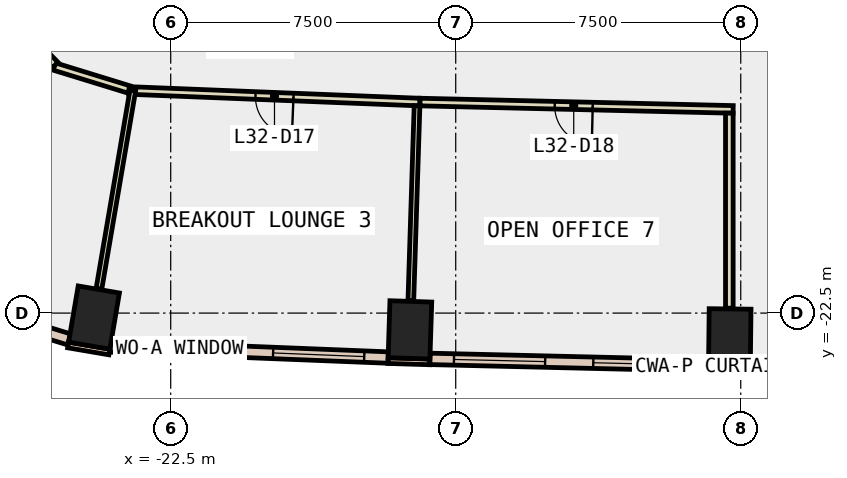
"""IFC4 building model, lengths in metres.
Left out: names, types, materials, properties, quantities, classifications, styles, units other than length and angle.
Written with IfcOpenShell. Run it as: python <this file> out.ifc"""

import sys

from ifc_helpers import new_model, si_unit, direction, frame, frame_2d, origin, origin_2d, place, context, subcontext, project, spatial, rectangle, extrude, element, fill, save


model = new_model("IFC4")
c1 = context("Model", 3, precision=1e-05, world=origin(), true_north=direction((0.0, 1.0)))
c2 = subcontext(c1, "Body", "Model", "MODEL_VIEW")
j1 = project(units=[si_unit("LENGTHUNIT", "METRE"), si_unit("PLANEANGLEUNIT", "RADIAN")], contexts=[c1])
p1 = place(None, origin())
s1 = spatial("IfcSite", under=j1, at=p1, CompositionType="ELEMENT")
p2 = place(p1, origin())
s2 = spatial("IfcBuilding", under=s1, at=p2, CompositionType="ELEMENT")
p3 = place(p2, frame((0.0, 0.0, 146.6)))
s3 = spatial("IfcBuildingStorey", under=s2, at=p3, CompositionType="ELEMENT", Elevation=146.6)
for number, where, z_axis, x_axis in (
    (1, (-24.518, -22.618, -0.4), (0.0, 0.0, 1.0), (-0.986, 0.168, 0.0)),
    (2, (-16.205, -22.942, -0.4), (0.0, 0.0, 1.0), (-0.999, 0.032, 0.0)),
    (3, (-7.789, -23.141, -0.4), (0.0, 0.0, 1.0), (-1.0, 0.012, 0.0)),
):
    element("IfcColumn", number, at=place(p3, frame(where, z_axis=z_axis, x_axis=x_axis)), inside=s3, PredefinedType="COLUMN", context=c2, shape_type="SweptSolid", body=[
        extrude(rectangle(XDim=1.1, YDim=1.5, at=origin_2d()), origin(), (0.0, 0.0, 1.0), 4.2),
    ])
p4 = place(p3, frame((-25.199, -23.339, 0.0), z_axis=(0.0, 0.0, 1.0), x_axis=(0.985800082077, -0.167923191299, 0.0)))
e4 = element("IfcWall", 4, at=p4, inside=s3, PredefinedType="STANDARD", context=c2, shape_type="SweptSolid", body=[
    extrude(rectangle(XDim=1.101, YDim=0.15, at=frame_2d((0.55, 0.0))), origin(), (0.0, 0.0, 1.0), 3.8),
])
p5 = place(p3, frame((-16.781, -23.75, 0.0), z_axis=(0.0, 0.0, 1.0), x_axis=(0.999523702549, -0.030860460829, 0.0)))
e5 = element("IfcWall", 5, at=p5, inside=s3, PredefinedType="STANDARD", context=c2, shape_type="SweptSolid", body=[
    extrude(rectangle(XDim=1.1, YDim=0.15, at=frame_2d((0.55, 0.0))), origin(), (0.0, 0.0, 1.0), 3.8),
])
p6 = place(p3, frame((-8.349, -23.96, 0.0), z_axis=(0.0, 0.0, 1.0), x_axis=(0.999940879068, -0.010873746799, 0.0)))
e6 = element("IfcWall", 6, at=p6, inside=s3, PredefinedType="STANDARD", context=c2, shape_type="SweptSolid", body=[
    extrude(rectangle(XDim=1.1, YDim=0.15, at=frame_2d((0.55, 0.0))), origin(), (0.0, 0.0, 1.0), 3.8),
])
p7 = place(p3, frame((-24.09, -23.378, 0.0), z_axis=(0.0, 0.0, 1.0), x_axis=(0.999203621229, -0.039901420066, 0.0)))
e7 = element("IfcWall", 7, at=p7, inside=s3, PredefinedType="STANDARD", context=c2, shape_type="SweptSolid", body=[
    extrude(rectangle(XDim=7.318, YDim=0.3, at=frame_2d((3.659, 0.0))), origin(), (0.0, 0.0, 1.0), 3.8),
])
p8 = place(p7, frame((0.629, 0.0, 0.9)))
e8 = element("IfcOpeningElement", 8, at=p8, cuts=e7, PredefinedType="OPENING", context=c2, shape_type="SweptSolid", body=[
    extrude(rectangle(XDim=2.4, YDim=2.6, at=frame_2d((1.2, 1.3))), frame((0.0, 0.16, 0.0), z_axis=(0.0, -1.0, 0.0), x_axis=(1.0, 0.0, 0.0)), (0.0, 0.0, 1.0), 0.32),
])
p9 = place(p7, frame((4.288, 0.0, 0.9)))
e9 = element("IfcOpeningElement", 9, at=p9, cuts=e7, PredefinedType="OPENING", context=c2, shape_type="SweptSolid", body=[
    extrude(rectangle(XDim=2.4, YDim=2.6, at=frame_2d((1.2, 1.3))), frame((0.0, 0.16, 0.0), z_axis=(0.0, -1.0, 0.0), x_axis=(1.0, 0.0, 0.0)), (0.0, 0.0, 1.0), 0.32),
])
p10 = place(p3, frame((-15.68, -23.705, 0.0), z_axis=(0.0, 0.0, 1.0), x_axis=(0.999722302867, -0.023565168146, 0.0)))
e10 = element("IfcWall", 10, at=p10, inside=s3, PredefinedType="STANDARD", context=c2, shape_type="SweptSolid", body=[
    extrude(rectangle(XDim=7.335, YDim=0.3, at=frame_2d((3.667, 0.0))), origin(), (0.0, 0.0, 1.0), 3.8),
])
p11 = place(p10, frame((0.634, 0.0, 0.9)))
e11 = element("IfcOpeningElement", 11, at=p11, cuts=e10, PredefinedType="OPENING", context=c2, shape_type="SweptSolid", body=[
    extrude(rectangle(XDim=2.4, YDim=2.6, at=frame_2d((1.2, 1.3))), frame((0.0, 0.16, 0.0), z_axis=(0.0, -1.0, 0.0), x_axis=(1.0, 0.0, 0.0)), (0.0, 0.0, 1.0), 0.32),
])
p12 = place(p10, frame((4.301, 0.0, 0.9)))
e12 = element("IfcOpeningElement", 12, at=p12, cuts=e10, PredefinedType="OPENING", context=c2, shape_type="SweptSolid", body=[
    extrude(rectangle(XDim=2.4, YDim=2.6, at=frame_2d((1.2, 1.3))), frame((0.0, 0.16, 0.0), z_axis=(0.0, -1.0, 0.0), x_axis=(1.0, 0.0, 0.0)), (0.0, 0.0, 1.0), 0.32),
])
p13 = place(p3, frame((-28.554, -22.154, 0.0), z_axis=(0.0, 0.0, 1.0), x_axis=(0.955874475611, -0.293775402094, 0.0)))
e13 = element("IfcWall", 13, at=p13, inside=s3, PredefinedType="STANDARD", context=c2, shape_type="SweptSolid", body=[
    extrude(rectangle(XDim=3.537, YDim=0.3, at=frame_2d((1.769, 0.0))), origin(), (0.0, 0.0, 1.0), 3.8),
])
p14 = place(p13, frame((1.069, 0.0, 0.9)))
e14 = element("IfcOpeningElement", 14, at=p14, cuts=e13, PredefinedType="OPENING", context=c2, shape_type="SweptSolid", body=[
    extrude(rectangle(XDim=1.4, YDim=2.6, at=frame_2d((0.7, 1.3))), frame((0.0, 0.16, 0.0), z_axis=(0.0, -1.0, 0.0), x_axis=(1.0, 0.0, 0.0)), (0.0, 0.0, 1.0), 0.32),
])
p15 = place(p3, frame((-23.594, -16.617, 0.0), z_axis=(0.0, 0.0, 1.0), x_axis=(-0.955896815358, 0.293702704087, 0.0)))
e15 = element("IfcWall", 15, at=p15, inside=s3, PredefinedType="PARTITIONING", context=c2, shape_type="SweptSolid", body=[
    extrude(rectangle(XDim=2.06, YDim=0.2, at=frame_2d((1.03, 0.0))), origin(), (0.0, 0.0, 1.0), 3.8),
])
p16 = place(p3, frame((-25.538, -15.97, 0.0), z_axis=(0.0, 0.0, 1.0), x_axis=(-0.698272822523, 0.715831729756, 0.0)))
e16 = element("IfcWall", 16, at=p16, inside=s3, PredefinedType="PARTITIONING", context=c2, shape_type="SweptSolid", body=[
    extrude(rectangle(XDim=1.196, YDim=0.2, at=frame_2d((0.598, 0.0))), origin(), (0.0, 0.0, 1.0), 3.8),
])
p17 = place(p3, frame((-15.94, -16.948, 0.0), z_axis=(0.0, 0.0, 1.0), x_axis=(-0.999203094545, 0.03991460699, 0.0)))
e17 = element("IfcWall", 17, at=p17, inside=s3, PredefinedType="PARTITIONING", context=c2, shape_type="SweptSolid", body=[
    extrude(rectangle(XDim=7.664, YDim=0.2, at=frame_2d((3.832, 0.0))), origin(), (0.0, 0.0, 1.0), 3.8),
])
p18 = place(p17, frame((3.332, 0.0, 0.0)))
e18 = element("IfcOpeningElement", 18, at=p18, cuts=e17, PredefinedType="OPENING", context=c2, shape_type="SweptSolid", body=[
    extrude(rectangle(XDim=1.0, YDim=2.1, at=frame_2d((0.5, 1.05))), frame((0.0, 0.11, 0.0), z_axis=(0.0, -1.0, 0.0), x_axis=(1.0, 0.0, 0.0)), (0.0, 0.0, 1.0), 0.22),
])
p19 = place(p3, frame((-7.7, -17.141, 0.0), z_axis=(0.0, 0.0, 1.0), x_axis=(-0.999722699727, 0.023548325865, 0.0)))
e19 = element("IfcWall", 19, at=p19, inside=s3, PredefinedType="PARTITIONING", context=c2, shape_type="SweptSolid", body=[
    extrude(rectangle(XDim=8.242, YDim=0.2, at=frame_2d((4.121, 0.0))), origin(), (0.0, 0.0, 1.0), 3.8),
])
p20 = place(p19, frame((3.696, 0.0, 0.0)))
e20 = element("IfcOpeningElement", 20, at=p20, cuts=e19, PredefinedType="OPENING", context=c2, shape_type="SweptSolid", body=[
    extrude(rectangle(XDim=1.0, YDim=2.1, at=frame_2d((0.5, 1.05))), frame((0.0, 0.11, 0.0), z_axis=(0.0, -1.0, 0.0), x_axis=(1.0, 0.0, 0.0)), (0.0, 0.0, 1.0), 0.22),
])
p21 = place(p3, frame((-7.8, -22.371, 0.0), z_axis=(0.0, 0.0, 1.0), x_axis=(0.0, 1.0, 0.0)))
e21 = element("IfcWall", 21, at=p21, inside=s3, PredefinedType="PARTITIONING", context=c2, shape_type="SweptSolid", body=[
    extrude(rectangle(XDim=5.132, YDim=0.2, at=frame_2d((2.566, 0.0))), origin(), (0.0, 0.0, 1.0), 3.8),
])
p22 = place(p3, frame((-23.498, -16.646, 0.0), z_axis=(0.0, 0.0, 1.0), x_axis=(-0.168275674737, -0.985739974482, 0.0)))
e22 = element("IfcWall", 22, at=p22, inside=s3, PredefinedType="PARTITIONING", context=c2, shape_type="SweptSolid", body=[
    extrude(rectangle(XDim=5.288, YDim=0.15, at=frame_2d((2.644, 0.0))), origin(), (0.0, 0.0, 1.0), 3.8),
])
p23 = place(p3, frame((-16.018, -17.045, 0.0), z_axis=(0.0, 0.0, 1.0), x_axis=(-0.031744385759, -0.999496019988, 0.0)))
e23 = element("IfcWall", 23, at=p23, inside=s3, PredefinedType="PARTITIONING", context=c2, shape_type="SweptSolid", body=[
    extrude(rectangle(XDim=5.13, YDim=0.15, at=frame_2d((2.565, 0.0))), origin(), (0.0, 0.0, 1.0), 3.8),
])
p24 = place(p8, origin())
e24 = element("IfcWindow", 24, at=p24, inside=s3, PartitioningType="SINGLE_PANEL", PredefinedType="WINDOW", context=c2, shape_type="SweptSolid", body=[
    extrude(rectangle(XDim=2.4, YDim=2.6, at=frame_2d((1.2, 1.3))), frame((0.0, 0.03, 0.0), z_axis=(0.0, -1.0, 0.0), x_axis=(1.0, 0.0, 0.0)), (0.0, 0.0, 1.0), 0.06),
])
fill(e8, e24)
p25 = place(p9, origin())
e25 = element("IfcWindow", 25, at=p25, inside=s3, PartitioningType="SINGLE_PANEL", PredefinedType="WINDOW", context=c2, shape_type="SweptSolid", body=[
    extrude(rectangle(XDim=2.4, YDim=2.6, at=frame_2d((1.2, 1.3))), frame((0.0, 0.03, 0.0), z_axis=(0.0, -1.0, 0.0), x_axis=(1.0, 0.0, 0.0)), (0.0, 0.0, 1.0), 0.06),
])
fill(e9, e25)
p26 = place(p11, origin())
e26 = element("IfcWindow", 26, at=p26, inside=s3, PartitioningType="SINGLE_PANEL", PredefinedType="WINDOW", context=c2, shape_type="SweptSolid", body=[
    extrude(rectangle(XDim=2.4, YDim=2.6, at=frame_2d((1.2, 1.3))), frame((0.0, 0.03, 0.0), z_axis=(0.0, -1.0, 0.0), x_axis=(1.0, 0.0, 0.0)), (0.0, 0.0, 1.0), 0.06),
])
fill(e11, e26)
p27 = place(p12, origin())
e27 = element("IfcWindow", 27, at=p27, inside=s3, PartitioningType="SINGLE_PANEL", PredefinedType="WINDOW", context=c2, shape_type="SweptSolid", body=[
    extrude(rectangle(XDim=2.4, YDim=2.6, at=frame_2d((1.2, 1.3))), frame((0.0, 0.03, 0.0), z_axis=(0.0, -1.0, 0.0), x_axis=(1.0, 0.0, 0.0)), (0.0, 0.0, 1.0), 0.06),
])
fill(e12, e27)
p28 = place(p18, origin())
e28 = element("IfcDoor", 28, at=p28, inside=s3, OperationType="SINGLE_SWING_LEFT", PredefinedType="DOOR", context=c2, shape_type="SweptSolid", body=[
    extrude(rectangle(XDim=1.0, YDim=2.1, at=frame_2d((0.5, 1.05))), frame((0.0, 0.025, 0.0), z_axis=(0.0, -1.0, 0.0), x_axis=(1.0, 0.0, 0.0)), (0.0, 0.0, 1.0), 0.05),
])
fill(e18, e28)
p29 = place(p20, origin())
e29 = element("IfcDoor", 29, at=p29, inside=s3, OperationType="SINGLE_SWING_RIGHT", PredefinedType="DOOR", context=c2, shape_type="SweptSolid", body=[
    extrude(rectangle(XDim=1.0, YDim=2.1, at=frame_2d((0.5, 1.05))), frame((0.0, 0.025, 0.0), z_axis=(0.0, -1.0, 0.0), x_axis=(1.0, 0.0, 0.0)), (0.0, 0.0, 1.0), 0.05),
])
fill(e20, e29)
save(model, sys.argv[1])
